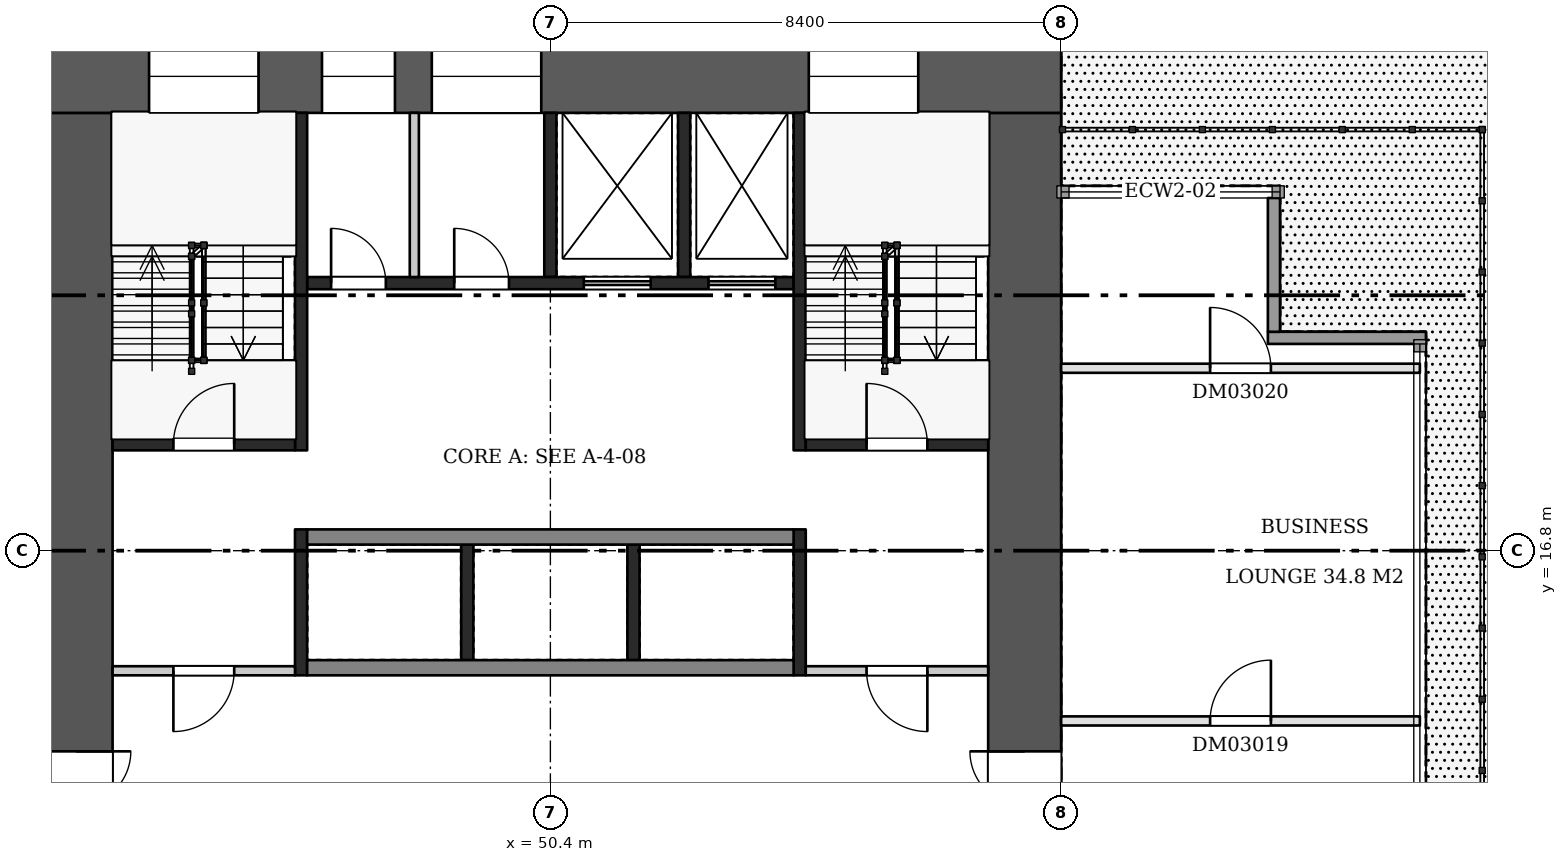
"""IFC4 building model, lengths in metres.
Left out: names, types, materials, properties, quantities, classifications, styles, units other than length and angle.
Written with IfcOpenShell. Run it as: python <this file> out.ifc"""

import sys

from ifc_helpers import new_model, si_unit, direction, frame, frame_2d, origin, place, context, subcontext, project, spatial, rectangle, extrude, element, fill, save


model = new_model("IFC4")
c1 = context("Model", 3, precision=1e-05, world=origin(), true_north=direction((0.0, 1.0)))
c2 = subcontext(c1, "Body", "Model", "MODEL_VIEW")
j1 = project(units=[si_unit("LENGTHUNIT", "METRE"), si_unit("PLANEANGLEUNIT", "RADIAN")], contexts=[c1])
p1 = place(None, origin())
s1 = spatial("IfcSite", under=j1, at=p1, CompositionType="ELEMENT")
p2 = place(p1, origin())
s2 = spatial("IfcBuilding", under=s1, at=p2, CompositionType="ELEMENT")
p3 = place(p2, frame((0.0, 0.0, 19.8)))
s3 = spatial("IfcBuildingStorey", under=s2, at=p3, CompositionType="ELEMENT", Elevation=19.8)
p4 = place(p3, frame((42.0, 24.6, 0.0), z_axis=(0.0, 0.0, 1.0), x_axis=(1.0, 0.0, 0.0)))
e1 = element("IfcWall", 1, at=p4, inside=s3, PredefinedType="SHEAR", context=c2, shape_type="SweptSolid", body=[
    extrude(rectangle(XDim=16.8, YDim=1.2, at=frame_2d((8.4, 0.0))), origin(), (0.0, 0.0, 1.0), 5.12),
])
p5 = place(p4, frame((1.8, 0.0, 0.5)))
e2 = element("IfcOpeningElement", 2, at=p5, cuts=e1, PredefinedType="OPENING", context=c2, shape_type="SweptSolid", body=[
    extrude(rectangle(XDim=1.8, YDim=2.4, at=frame_2d((0.9, 1.2))), frame((0.0, 0.61, 0.0), z_axis=(0.0, -1.0, 0.0), x_axis=(1.0, 0.0, 0.0)), (0.0, 0.0, 1.0), 1.22),
])
p6 = place(p4, frame((4.644, 0.0, 1.6)))
e3 = element("IfcOpeningElement", 3, at=p6, cuts=e1, PredefinedType="OPENING", context=c2, shape_type="SweptSolid", body=[
    extrude(rectangle(XDim=1.2, YDim=1.2, at=frame_2d((0.6, 0.6))), frame((0.0, 0.61, 0.0), z_axis=(0.0, -1.0, 0.0), x_axis=(1.0, 0.0, 0.0)), (0.0, 0.0, 1.0), 1.22),
])
p7 = place(p4, frame((6.45, 0.0, 1.6)))
e4 = element("IfcOpeningElement", 4, at=p7, cuts=e1, PredefinedType="OPENING", context=c2, shape_type="SweptSolid", body=[
    extrude(rectangle(XDim=1.8, YDim=1.2, at=frame_2d((0.9, 0.6))), frame((0.0, 0.61, 0.0), z_axis=(0.0, -1.0, 0.0), x_axis=(1.0, 0.0, 0.0)), (0.0, 0.0, 1.0), 1.22),
])
p8 = place(p4, frame((12.65, 0.0, 0.5)))
e5 = element("IfcOpeningElement", 5, at=p8, cuts=e1, PredefinedType="OPENING", context=c2, shape_type="SweptSolid", body=[
    extrude(rectangle(XDim=1.8, YDim=2.4, at=frame_2d((0.9, 1.2))), frame((0.0, 0.61, 0.0), z_axis=(0.0, -1.0, 0.0), x_axis=(1.0, 0.0, 0.0)), (0.0, 0.0, 1.0), 1.22),
])
p9 = place(p3, frame((42.6, 9.6, 0.0), z_axis=(0.0, 0.0, 1.0), x_axis=(0.0, 1.0, 0.0)))
e6 = element("IfcWall", 6, at=p9, inside=s3, PredefinedType="SHEAR", context=c2, shape_type="SweptSolid", body=[
    extrude(rectangle(XDim=14.4, YDim=1.2, at=frame_2d((7.2, 0.0))), origin(), (0.0, 0.0, 1.0), 5.12),
])
p10 = place(p9, frame((2.1, 0.0, 0.0)))
e7 = element("IfcOpeningElement", 7, at=p10, cuts=e6, PredefinedType="OPENING", context=c2, shape_type="SweptSolid", body=[
    extrude(rectangle(XDim=1.8, YDim=2.1, at=frame_2d((0.9, 1.05))), frame((0.0, 0.61, 0.0), z_axis=(0.0, -1.0, 0.0), x_axis=(1.0, 0.0, 0.0)), (0.0, 0.0, 1.0), 1.22),
])
p11 = place(p3, frame((58.2, 9.6, 0.0), z_axis=(0.0, 0.0, 1.0), x_axis=(0.0, 1.0, 0.0)))
e8 = element("IfcWall", 8, at=p11, inside=s3, PredefinedType="SHEAR", context=c2, shape_type="SweptSolid", body=[
    extrude(rectangle(XDim=14.4, YDim=1.2, at=frame_2d((7.2, 0.0))), origin(), (0.0, 0.0, 1.0), 5.12),
])
p12 = place(p11, frame((2.1, 0.0, 0.0)))
e9 = element("IfcOpeningElement", 9, at=p12, cuts=e8, PredefinedType="OPENING", context=c2, shape_type="SweptSolid", body=[
    extrude(rectangle(XDim=1.8, YDim=2.1, at=frame_2d((0.9, 1.05))), frame((0.0, 0.61, 0.0), z_axis=(0.0, -1.0, 0.0), x_axis=(1.0, 0.0, 0.0)), (0.0, 0.0, 1.0), 1.22),
])
for number, where, z_axis, x_axis in (
    (10, (49.033, 15.0, 0.0), (0.0, 0.0, 1.0), (0.0, 1.0, 0.0)),
    (11, (51.767, 15.0, 0.0), (0.0, 0.0, 1.0), (0.0, 1.0, 0.0)),
):
    element("IfcWall", number, at=place(p3, frame(where, z_axis=z_axis, x_axis=x_axis)), inside=s3, PredefinedType="SHEAR", context=c2, shape_type="SweptSolid", body=[
        extrude(rectangle(XDim=1.9, YDim=0.2, at=frame_2d((0.95, 0.0))), origin(), (0.0, 0.0, 1.0), 5.12),
    ])
for number, where, z_axis, x_axis in (
    (12, (46.4, 14.875, 0.0), (0.0, 0.0, 1.0), (1.0, 0.0, 0.0)),
    (13, (46.4, 17.025, 0.0), (0.0, 0.0, 1.0), (1.0, 0.0, 0.0)),
):
    element("IfcWall", number, at=place(p3, frame(where, z_axis=z_axis, x_axis=x_axis)), inside=s3, PredefinedType="SHEAR", context=c2, shape_type="SweptSolid", body=[
        extrude(rectangle(XDim=8.0, YDim=0.25, at=frame_2d((4.0, 0.0))), origin(), (0.0, 0.0, 1.0), 5.12),
    ])
for number, where, z_axis, x_axis in (
    (14, (50.4, 21.3, 0.0), (0.0, 0.0, 1.0), (0.0, 1.0, 0.0)),
    (15, (52.6, 21.3, 0.0), (0.0, 0.0, 1.0), (0.0, 1.0, 0.0)),
):
    element("IfcWall", number, at=place(p3, frame(where, z_axis=z_axis, x_axis=x_axis)), inside=s3, PredefinedType="SHEAR", context=c2, shape_type="SweptSolid", body=[
        extrude(rectangle(XDim=2.7, YDim=0.2, at=frame_2d((1.35, 0.0))), origin(), (0.0, 0.0, 1.0), 5.12),
    ])
p13 = place(p3, frame((48.163, 21.3, 0.0), z_axis=(0.0, 0.0, 1.0), x_axis=(0.0, 1.0, 0.0)))
e16 = element("IfcWall", 16, at=p13, inside=s3, PredefinedType="PARTITIONING", context=c2, shape_type="SweptSolid", body=[
    extrude(rectangle(XDim=2.7, YDim=0.15, at=frame_2d((1.35, 0.0))), origin(), (0.0, 0.0, 1.0), 5.12),
])
p14 = place(p3, frame((46.4, 21.2, 0.0), z_axis=(0.0, 0.0, 1.0), x_axis=(1.0, 0.0, 0.0)))
e17 = element("IfcWall", 17, at=p14, inside=s3, PredefinedType="SHEAR", context=c2, shape_type="SweptSolid", body=[
    extrude(rectangle(XDim=8.0, YDim=0.2, at=frame_2d((4.0, 0.0))), origin(), (0.0, 0.0, 1.0), 5.12),
])
p15 = place(p14, frame((0.394, 0.0, 0.0)))
e18 = element("IfcOpeningElement", 18, at=p15, cuts=e17, PredefinedType="OPENING", context=c2, shape_type="SweptSolid", body=[
    extrude(rectangle(XDim=0.9, YDim=2.1, at=frame_2d((0.45, 1.05))), frame((0.0, 0.11, 0.0), z_axis=(0.0, -1.0, 0.0), x_axis=(1.0, 0.0, 0.0)), (0.0, 0.0, 1.0), 0.22),
])
p16 = place(p14, frame((2.419, 0.0, 0.0)))
e19 = element("IfcOpeningElement", 19, at=p16, cuts=e17, PredefinedType="OPENING", context=c2, shape_type="SweptSolid", body=[
    extrude(rectangle(XDim=0.9, YDim=2.1, at=frame_2d((0.45, 1.05))), frame((0.0, 0.11, 0.0), z_axis=(0.0, -1.0, 0.0), x_axis=(1.0, 0.0, 0.0)), (0.0, 0.0, 1.0), 0.22),
])
p17 = place(p14, frame((4.55, 0.0, 0.0)))
e20 = element("IfcOpeningElement", 20, at=p17, cuts=e17, PredefinedType="OPENING", context=c2, shape_type="SweptSolid", body=[
    extrude(rectangle(XDim=1.1, YDim=2.1, at=frame_2d((0.55, 1.05))), frame((0.0, 0.11, 0.0), z_axis=(0.0, -1.0, 0.0), x_axis=(1.0, 0.0, 0.0)), (0.0, 0.0, 1.0), 0.22),
])
p18 = place(p14, frame((6.6, 0.0, 0.0)))
e21 = element("IfcOpeningElement", 21, at=p18, cuts=e17, PredefinedType="OPENING", context=c2, shape_type="SweptSolid", body=[
    extrude(rectangle(XDim=1.1, YDim=2.1, at=frame_2d((0.55, 1.05))), frame((0.0, 0.11, 0.0), z_axis=(0.0, -1.0, 0.0), x_axis=(1.0, 0.0, 0.0)), (0.0, 0.0, 1.0), 0.22),
])
p19 = place(p3, frame((46.3, 14.75, 0.0), z_axis=(0.0, 0.0, 1.0), x_axis=(0.0, 1.0, 0.0)))
e22 = element("IfcWall", 22, at=p19, inside=s3, PredefinedType="SHEAR", context=c2, shape_type="SweptSolid", body=[
    extrude(rectangle(XDim=2.4, YDim=0.2, at=frame_2d((1.2, 0.0))), origin(), (0.0, 0.0, 1.0), 5.12),
])
p20 = place(p3, frame((46.3, 18.45, 0.0), z_axis=(0.0, 0.0, 1.0), x_axis=(0.0, 1.0, 0.0)))
e23 = element("IfcWall", 23, at=p20, inside=s3, PredefinedType="SHEAR", context=c2, shape_type="SweptSolid", body=[
    extrude(rectangle(XDim=5.55, YDim=0.2, at=frame_2d((2.775, 0.0))), origin(), (0.0, 0.0, 1.0), 5.12),
])
p21 = place(p3, frame((43.2, 14.825, 0.0), z_axis=(0.0, 0.0, 1.0), x_axis=(1.0, 0.0, 0.0)))
e24 = element("IfcWall", 24, at=p21, inside=s3, PredefinedType="PARTITIONING", context=c2, shape_type="SweptSolid", body=[
    extrude(rectangle(XDim=3.0, YDim=0.15, at=frame_2d((1.5, 0.0))), origin(), (0.0, 0.0, 1.0), 5.12),
])
p22 = place(p21, frame((1.0, 0.0, 0.0)))
e25 = element("IfcOpeningElement", 25, at=p22, cuts=e24, PredefinedType="OPENING", context=c2, shape_type="SweptSolid", body=[
    extrude(rectangle(XDim=1.0, YDim=2.1, at=frame_2d((0.5, 1.05))), frame((0.0, 0.085, 0.0), z_axis=(0.0, -1.0, 0.0), x_axis=(1.0, 0.0, 0.0)), (0.0, 0.0, 1.0), 0.17),
])
p23 = place(p3, frame((43.2, 18.55, 0.0), z_axis=(0.0, 0.0, 1.0), x_axis=(1.0, 0.0, 0.0)))
e26 = element("IfcWall", 26, at=p23, inside=s3, PredefinedType="SHEAR", context=c2, shape_type="SweptSolid", body=[
    extrude(rectangle(XDim=3.0, YDim=0.2, at=frame_2d((1.5, 0.0))), origin(), (0.0, 0.0, 1.0), 5.12),
])
p24 = place(p23, frame((1.0, 0.0, 0.0)))
e27 = element("IfcOpeningElement", 27, at=p24, cuts=e26, PredefinedType="OPENING", context=c2, shape_type="SweptSolid", body=[
    extrude(rectangle(XDim=1.0, YDim=2.1, at=frame_2d((0.5, 1.05))), frame((0.0, 0.11, 0.0), z_axis=(0.0, -1.0, 0.0), x_axis=(1.0, 0.0, 0.0)), (0.0, 0.0, 1.0), 0.22),
])
p25 = place(p3, frame((54.5, 14.75, 0.0), z_axis=(0.0, 0.0, 1.0), x_axis=(0.0, 1.0, 0.0)))
e28 = element("IfcWall", 28, at=p25, inside=s3, PredefinedType="SHEAR", context=c2, shape_type="SweptSolid", body=[
    extrude(rectangle(XDim=2.4, YDim=0.2, at=frame_2d((1.2, 0.0))), origin(), (0.0, 0.0, 1.0), 5.12),
])
p26 = place(p3, frame((54.5, 18.45, 0.0), z_axis=(0.0, 0.0, 1.0), x_axis=(0.0, 1.0, 0.0)))
e29 = element("IfcWall", 29, at=p26, inside=s3, PredefinedType="SHEAR", context=c2, shape_type="SweptSolid", body=[
    extrude(rectangle(XDim=5.55, YDim=0.2, at=frame_2d((2.775, 0.0))), origin(), (0.0, 0.0, 1.0), 5.12),
])
p27 = place(p3, frame((54.6, 14.825, 0.0), z_axis=(0.0, 0.0, 1.0), x_axis=(1.0, 0.0, 0.0)))
e30 = element("IfcWall", 30, at=p27, inside=s3, PredefinedType="PARTITIONING", context=c2, shape_type="SweptSolid", body=[
    extrude(rectangle(XDim=3.0, YDim=0.15, at=frame_2d((1.5, 0.0))), origin(), (0.0, 0.0, 1.0), 5.12),
])
p28 = place(p27, frame((1.0, 0.0, 0.0)))
e31 = element("IfcOpeningElement", 31, at=p28, cuts=e30, PredefinedType="OPENING", context=c2, shape_type="SweptSolid", body=[
    extrude(rectangle(XDim=1.0, YDim=2.1, at=frame_2d((0.5, 1.05))), frame((0.0, 0.085, 0.0), z_axis=(0.0, -1.0, 0.0), x_axis=(1.0, 0.0, 0.0)), (0.0, 0.0, 1.0), 0.17),
])
p29 = place(p3, frame((54.6, 18.55, 0.0), z_axis=(0.0, 0.0, 1.0), x_axis=(1.0, 0.0, 0.0)))
e32 = element("IfcWall", 32, at=p29, inside=s3, PredefinedType="SHEAR", context=c2, shape_type="SweptSolid", body=[
    extrude(rectangle(XDim=3.0, YDim=0.2, at=frame_2d((1.5, 0.0))), origin(), (0.0, 0.0, 1.0), 5.12),
])
p30 = place(p29, frame((1.0, 0.0, 0.0)))
e33 = element("IfcOpeningElement", 33, at=p30, cuts=e32, PredefinedType="OPENING", context=c2, shape_type="SweptSolid", body=[
    extrude(rectangle(XDim=1.0, YDim=2.1, at=frame_2d((0.5, 1.05))), frame((0.0, 0.11, 0.0), z_axis=(0.0, -1.0, 0.0), x_axis=(1.0, 0.0, 0.0)), (0.0, 0.0, 1.0), 0.22),
])
p31 = place(p3, frame((58.8, 14.0, 0.0), z_axis=(0.0, 0.0, 1.0), x_axis=(1.0, 0.0, 0.0)))
e34 = element("IfcWall", 34, at=p31, inside=s3, PredefinedType="PARTITIONING", context=c2, shape_type="SweptSolid", body=[
    extrude(rectangle(XDim=5.9, YDim=0.15, at=frame_2d((2.95, 0.0))), origin(), (0.0, 0.0, 1.0), 5.12),
])
p32 = place(p31, frame((2.45, 0.0, 0.0)))
e35 = element("IfcOpeningElement", 35, at=p32, cuts=e34, PredefinedType="OPENING", context=c2, shape_type="SweptSolid", body=[
    extrude(rectangle(XDim=1.0, YDim=2.1, at=frame_2d((0.5, 1.05))), frame((0.0, 0.085, 0.0), z_axis=(0.0, -1.0, 0.0), x_axis=(1.0, 0.0, 0.0)), (0.0, 0.0, 1.0), 0.17),
])
p33 = place(p3, frame((58.8, 19.8, 0.0), z_axis=(0.0, 0.0, 1.0), x_axis=(1.0, 0.0, 0.0)))
e36 = element("IfcWall", 36, at=p33, inside=s3, PredefinedType="PARTITIONING", context=c2, shape_type="SweptSolid", body=[
    extrude(rectangle(XDim=5.9, YDim=0.15, at=frame_2d((2.95, 0.0))), origin(), (0.0, 0.0, 1.0), 5.12),
])
p34 = place(p33, frame((2.45, 0.0, 0.0)))
e37 = element("IfcOpeningElement", 37, at=p34, cuts=e36, PredefinedType="OPENING", context=c2, shape_type="SweptSolid", body=[
    extrude(rectangle(XDim=1.0, YDim=2.1, at=frame_2d((0.5, 1.05))), frame((0.0, 0.085, 0.0), z_axis=(0.0, -1.0, 0.0), x_axis=(1.0, 0.0, 0.0)), (0.0, 0.0, 1.0), 0.17),
])
p35 = place(p3, frame((64.8, 20.3, 0.0), z_axis=(0.0, 0.0, 1.0), x_axis=(-1.0, 0.0, 0.0)))
e38 = element("IfcWall", 38, at=p35, inside=s3, PredefinedType="SOLIDWALL", context=c2, shape_type="SweptSolid", body=[
    extrude(rectangle(XDim=2.6, YDim=0.2, at=frame_2d((1.3, 0.0))), origin(), (0.0, 0.0, 1.0), 5.12),
])
p36 = place(p3, frame((62.3, 20.4, 0.0), z_axis=(0.0, 0.0, 1.0), x_axis=(0.0, 1.0, 0.0)))
e39 = element("IfcWall", 39, at=p36, inside=s3, PredefinedType="SOLIDWALL", context=c2, shape_type="SweptSolid", body=[
    extrude(rectangle(XDim=2.2, YDim=0.2, at=frame_2d((1.1, 0.0))), origin(), (0.0, 0.0, 1.0), 5.12),
])
p37 = place(p10, frame((1.8, 0.0, 0.0), z_axis=(0.0, 0.0, 1.0), x_axis=(-1.0, 0.0, 0.0)))
e40 = element("IfcDoor", 40, at=p37, inside=s3, OperationType="DOUBLE_DOOR_SINGLE_SWING", PredefinedType="DOOR", context=c2, shape_type="SweptSolid", body=[
    extrude(rectangle(XDim=1.8, YDim=2.1, at=frame_2d((0.9, 1.05))), frame((0.0, 0.025, 0.0), z_axis=(0.0, -1.0, 0.0), x_axis=(1.0, 0.0, 0.0)), (0.0, 0.0, 1.0), 0.05),
])
fill(e7, e40)
p38 = place(p12, origin())
e41 = element("IfcDoor", 41, at=p38, inside=s3, OperationType="DOUBLE_DOOR_SINGLE_SWING", PredefinedType="DOOR", context=c2, shape_type="SweptSolid", body=[
    extrude(rectangle(XDim=1.8, YDim=2.1, at=frame_2d((0.9, 1.05))), frame((0.0, 0.025, 0.0), z_axis=(0.0, -1.0, 0.0), x_axis=(1.0, 0.0, 0.0)), (0.0, 0.0, 1.0), 0.05),
])
fill(e9, e41)
p39 = place(p15, origin())
e42 = element("IfcDoor", 42, at=p39, inside=s3, OperationType="SINGLE_SWING_LEFT", PredefinedType="DOOR", context=c2, shape_type="SweptSolid", body=[
    extrude(rectangle(XDim=0.9, YDim=2.1, at=frame_2d((0.45, 1.05))), frame((0.0, 0.025, 0.0), z_axis=(0.0, -1.0, 0.0), x_axis=(1.0, 0.0, 0.0)), (0.0, 0.0, 1.0), 0.05),
])
fill(e18, e42)
p40 = place(p16, origin())
e43 = element("IfcDoor", 43, at=p40, inside=s3, OperationType="SINGLE_SWING_LEFT", PredefinedType="DOOR", context=c2, shape_type="SweptSolid", body=[
    extrude(rectangle(XDim=0.9, YDim=2.1, at=frame_2d((0.45, 1.05))), frame((0.0, 0.025, 0.0), z_axis=(0.0, -1.0, 0.0), x_axis=(1.0, 0.0, 0.0)), (0.0, 0.0, 1.0), 0.05),
])
fill(e19, e43)
p41 = place(p17, origin())
e44 = element("IfcDoor", 44, at=p41, inside=s3, OperationType="DOUBLE_DOOR_SLIDING", PredefinedType="DOOR", context=c2, shape_type="SweptSolid", body=[
    extrude(rectangle(XDim=1.1, YDim=2.1, at=frame_2d((0.55, 1.05))), frame((0.0, 0.025, 0.0), z_axis=(0.0, -1.0, 0.0), x_axis=(1.0, 0.0, 0.0)), (0.0, 0.0, 1.0), 0.05),
])
fill(e20, e44)
p42 = place(p18, origin())
e45 = element("IfcDoor", 45, at=p42, inside=s3, OperationType="DOUBLE_DOOR_SLIDING", PredefinedType="DOOR", context=c2, shape_type="SweptSolid", body=[
    extrude(rectangle(XDim=1.1, YDim=2.1, at=frame_2d((0.55, 1.05))), frame((0.0, 0.025, 0.0), z_axis=(0.0, -1.0, 0.0), x_axis=(1.0, 0.0, 0.0)), (0.0, 0.0, 1.0), 0.05),
])
fill(e21, e45)
p43 = place(p22, frame((1.0, 0.0, 0.0), z_axis=(0.0, 0.0, 1.0), x_axis=(-1.0, 0.0, 0.0)))
e46 = element("IfcDoor", 46, at=p43, inside=s3, OperationType="SINGLE_SWING_RIGHT", PredefinedType="DOOR", context=c2, shape_type="SweptSolid", body=[
    extrude(rectangle(XDim=1.0, YDim=2.1, at=frame_2d((0.5, 1.05))), frame((0.0, 0.025, 0.0), z_axis=(0.0, -1.0, 0.0), x_axis=(1.0, 0.0, 0.0)), (0.0, 0.0, 1.0), 0.05),
])
fill(e25, e46)
p44 = place(p24, origin())
e47 = element("IfcDoor", 47, at=p44, inside=s3, OperationType="SINGLE_SWING_RIGHT", PredefinedType="DOOR", context=c2, shape_type="SweptSolid", body=[
    extrude(rectangle(XDim=1.0, YDim=2.1, at=frame_2d((0.5, 1.05))), frame((0.0, 0.025, 0.0), z_axis=(0.0, -1.0, 0.0), x_axis=(1.0, 0.0, 0.0)), (0.0, 0.0, 1.0), 0.05),
])
fill(e27, e47)
p45 = place(p28, frame((1.0, 0.0, 0.0), z_axis=(0.0, 0.0, 1.0), x_axis=(-1.0, 0.0, 0.0)))
e48 = element("IfcDoor", 48, at=p45, inside=s3, OperationType="SINGLE_SWING_LEFT", PredefinedType="DOOR", context=c2, shape_type="SweptSolid", body=[
    extrude(rectangle(XDim=1.0, YDim=2.1, at=frame_2d((0.5, 1.05))), frame((0.0, 0.025, 0.0), z_axis=(0.0, -1.0, 0.0), x_axis=(1.0, 0.0, 0.0)), (0.0, 0.0, 1.0), 0.05),
])
fill(e31, e48)
p46 = place(p30, origin())
e49 = element("IfcDoor", 49, at=p46, inside=s3, OperationType="SINGLE_SWING_LEFT", PredefinedType="DOOR", context=c2, shape_type="SweptSolid", body=[
    extrude(rectangle(XDim=1.0, YDim=2.1, at=frame_2d((0.5, 1.05))), frame((0.0, 0.025, 0.0), z_axis=(0.0, -1.0, 0.0), x_axis=(1.0, 0.0, 0.0)), (0.0, 0.0, 1.0), 0.05),
])
fill(e33, e49)
p47 = place(p5, origin())
e50 = element("IfcWindow", 50, at=p47, inside=s3, PartitioningType="SINGLE_PANEL", PredefinedType="WINDOW", context=c2, shape_type="SweptSolid", body=[
    extrude(rectangle(XDim=1.8, YDim=2.4, at=frame_2d((0.9, 1.2))), frame((0.0, 0.03, 0.0), z_axis=(0.0, -1.0, 0.0), x_axis=(1.0, 0.0, 0.0)), (0.0, 0.0, 1.0), 0.06),
])
fill(e2, e50)
p48 = place(p6, origin())
e51 = element("IfcWindow", 51, at=p48, inside=s3, PartitioningType="SINGLE_PANEL", PredefinedType="WINDOW", context=c2, shape_type="SweptSolid", body=[
    extrude(rectangle(XDim=1.2, YDim=1.2, at=frame_2d((0.6, 0.6))), frame((0.0, 0.03, 0.0), z_axis=(0.0, -1.0, 0.0), x_axis=(1.0, 0.0, 0.0)), (0.0, 0.0, 1.0), 0.06),
])
fill(e3, e51)
p49 = place(p7, origin())
e52 = element("IfcWindow", 52, at=p49, inside=s3, PartitioningType="SINGLE_PANEL", PredefinedType="WINDOW", context=c2, shape_type="SweptSolid", body=[
    extrude(rectangle(XDim=1.8, YDim=1.2, at=frame_2d((0.9, 0.6))), frame((0.0, 0.03, 0.0), z_axis=(0.0, -1.0, 0.0), x_axis=(1.0, 0.0, 0.0)), (0.0, 0.0, 1.0), 0.06),
])
fill(e4, e52)
p50 = place(p8, origin())
e53 = element("IfcWindow", 53, at=p50, inside=s3, PartitioningType="SINGLE_PANEL", PredefinedType="WINDOW", context=c2, shape_type="SweptSolid", body=[
    extrude(rectangle(XDim=1.8, YDim=2.4, at=frame_2d((0.9, 1.2))), frame((0.0, 0.03, 0.0), z_axis=(0.0, -1.0, 0.0), x_axis=(1.0, 0.0, 0.0)), (0.0, 0.0, 1.0), 0.06),
])
fill(e5, e53)
p51 = place(p32, origin())
e54 = element("IfcDoor", 54, at=p51, inside=s3, OperationType="SINGLE_SWING_RIGHT", PredefinedType="DOOR", context=c2, shape_type="SweptSolid", body=[
    extrude(rectangle(XDim=1.0, YDim=2.1, at=frame_2d((0.5, 1.05))), frame((0.0, 0.025, 0.0), z_axis=(0.0, -1.0, 0.0), x_axis=(1.0, 0.0, 0.0)), (0.0, 0.0, 1.0), 0.05),
])
fill(e35, e54)
p52 = place(p34, origin())
e55 = element("IfcDoor", 55, at=p52, inside=s3, OperationType="SINGLE_SWING_LEFT", PredefinedType="DOOR", context=c2, shape_type="SweptSolid", body=[
    extrude(rectangle(XDim=1.0, YDim=2.1, at=frame_2d((0.5, 1.05))), frame((0.0, 0.025, 0.0), z_axis=(0.0, -1.0, 0.0), x_axis=(1.0, 0.0, 0.0)), (0.0, 0.0, 1.0), 0.05),
])
fill(e37, e55)
save(model, sys.argv[1])
